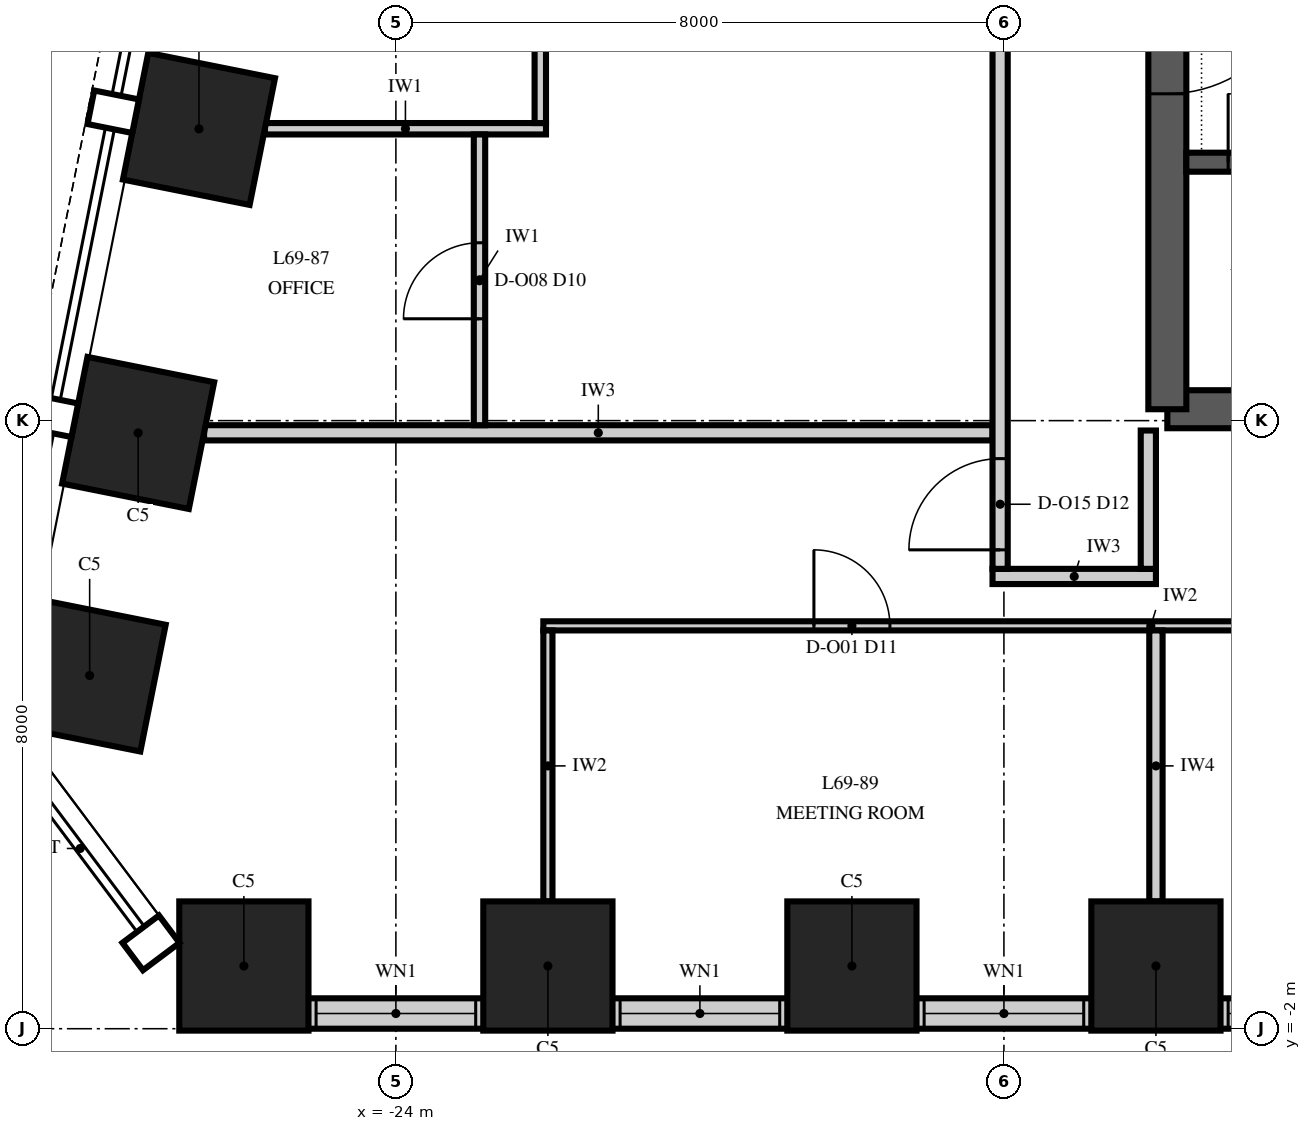
"""IFC4 building model, lengths in metres.
Left out: names, types, materials, properties, quantities, classifications, styles, units other than length and angle.
Written with IfcOpenShell. Run it as: python <this file> out.ifc"""

import sys

from ifc_helpers import new_model, si_unit, direction, frame, frame_2d, origin, origin_2d, place, context, subcontext, project, spatial, polyline, rectangle, outline, extrude, element, fill, save


model = new_model("IFC4")
c1 = context("Model", 3, precision=1e-05, world=origin(), true_north=direction((0.0, 1.0)))
c2 = subcontext(c1, "Body", "Model", "MODEL_VIEW")
j1 = project(units=[si_unit("LENGTHUNIT", "METRE"), si_unit("PLANEANGLEUNIT", "RADIAN")], contexts=[c1])
p1 = place(None, origin())
s1 = spatial("IfcSite", under=j1, at=p1, CompositionType="ELEMENT")
p2 = place(p1, origin())
s2 = spatial("IfcBuilding", under=s1, at=p2, CompositionType="ELEMENT")
p3 = place(p2, frame((0.0, 0.0, 296.0)))
s3 = spatial("IfcBuildingStorey", under=s2, at=p3, CompositionType="ELEMENT", Elevation=296.0)
for number, where, z_axis, x_axis in (
    (1, (-26.0, -1.175, -0.25), (0.0, 0.0, 1.0), (1.0, 0.0, 0.0)),
    (2, (-22.0, -1.175, -0.25), (0.0, 0.0, 1.0), (1.0, 0.0, 0.0)),
    (3, (-18.0, -1.175, -0.25), (0.0, 0.0, 1.0), (1.0, 0.0, 0.0)),
    (4, (-14.0, -1.175, -0.25), (0.0, 0.0, 1.0), (1.0, 0.0, 0.0)),
):
    element("IfcColumn", number, at=place(p3, frame(where, z_axis=z_axis, x_axis=x_axis)), inside=s3, PredefinedType="COLUMN", context=c2, shape_type="SweptSolid", body=[
        extrude(rectangle(XDim=1.7, YDim=1.7, at=origin_2d()), origin(), (0.0, 0.0, 1.0), 4.25),
    ])
for number, where, z_axis, x_axis in (
    (5, (-26.591, 9.838, 0.0), (0.0, 0.0, 1.0), (-0.196, -0.981, 0.0)),
    (6, (-27.391, 5.838, 0.0), (0.0, 0.0, 1.0), (-0.196, -0.981, 0.0)),
    (7, (-28.029, 2.647, 0.0), (0.0, 0.0, 1.0), (-0.196, -0.981, 0.0)),
):
    element("IfcColumn", number, at=place(p3, frame(where, z_axis=z_axis, x_axis=x_axis)), inside=s3, PredefinedType="COLUMN", context=c2, shape_type="SweptSolid", body=[
        extrude(rectangle(XDim=1.7, YDim=1.7, at=origin_2d()), origin(), (0.0, 0.0, 1.0), 4.0),
    ])
p4 = place(p3, frame((-13.85, 6.15, 0.0), z_axis=(0.0, 0.0, 1.0), x_axis=(1.0, 0.0, 0.0)))
e8 = element("IfcWall", 8, at=p4, inside=s3, PredefinedType="SHEAR", context=c2, shape_type="SweptSolid", body=[
    extrude(rectangle(XDim=27.7, YDim=0.5, at=frame_2d((13.85, 0.0))), origin(), (0.0, 0.0, 1.0), 4.0),
])
p5 = place(p3, frame((-13.85, 23.85, 0.0), z_axis=(0.0, 0.0, 1.0), x_axis=(0.0, -1.0, 0.0)))
e9 = element("IfcWall", 9, at=p5, inside=s3, PredefinedType="SHEAR", context=c2, shape_type="SweptSolid", body=[
    extrude(outline(polyline([(0.0, -0.25), (17.7, -0.25), (17.7, 0.0), (17.45, 0.0), (17.45, 0.25), (0.25, 0.25), (0.25, 0.0), (0.0, 0.0), (0.0, -0.25)])), origin(), (0.0, 0.0, 1.0), 4.0),
])
p6 = place(p5, frame((11.75, 0.0, 0.0)))
e10 = element("IfcOpeningElement", 10, at=p6, cuts=e9, PredefinedType="OPENING", context=c2, shape_type="SweptSolid", body=[
    extrude(rectangle(XDim=1.8, YDim=2.4, at=frame_2d((0.9, 1.2))), frame((0.0, 0.265, 0.0), z_axis=(0.0, -1.0, 0.0), x_axis=(1.0, 0.0, 0.0)), (0.0, 0.0, 1.0), 0.53),
])
p7 = place(p3, frame((-13.6, 9.4, 0.0), z_axis=(0.0, 0.0, 1.0), x_axis=(1.0, 0.0, 0.0)))
e11 = element("IfcWall", 11, at=p7, inside=s3, PredefinedType="SHEAR", context=c2, shape_type="SweptSolid", body=[
    extrude(rectangle(XDim=27.2, YDim=0.25, at=frame_2d((13.6, 0.0))), origin(), (0.0, 0.0, 1.0), 4.0),
])
p8 = place(p7, frame((8.85, 0.0, 0.0)))
e12 = element("IfcOpeningElement", 12, at=p8, cuts=e11, PredefinedType="OPENING", context=c2, shape_type="SweptSolid", body=[
    extrude(rectangle(XDim=1.1, YDim=2.1, at=frame_2d((0.55, 1.05))), frame((0.0, 0.14, 0.0), z_axis=(0.0, -1.0, 0.0), x_axis=(1.0, 0.0, 0.0)), (0.0, 0.0, 1.0), 0.28),
])
p9 = place(p7, frame((11.65, 0.0, 0.0)))
e13 = element("IfcOpeningElement", 13, at=p9, cuts=e11, PredefinedType="OPENING", context=c2, shape_type="SweptSolid", body=[
    extrude(rectangle(XDim=1.1, YDim=2.1, at=frame_2d((0.55, 1.05))), frame((0.0, 0.14, 0.0), z_axis=(0.0, -1.0, 0.0), x_axis=(1.0, 0.0, 0.0)), (0.0, 0.0, 1.0), 0.28),
])
p10 = place(p7, frame((14.45, 0.0, 0.0)))
e14 = element("IfcOpeningElement", 14, at=p10, cuts=e11, PredefinedType="OPENING", context=c2, shape_type="SweptSolid", body=[
    extrude(rectangle(XDim=1.1, YDim=2.1, at=frame_2d((0.55, 1.05))), frame((0.0, 0.14, 0.0), z_axis=(0.0, -1.0, 0.0), x_axis=(1.0, 0.0, 0.0)), (0.0, 0.0, 1.0), 0.28),
])
p11 = place(p7, frame((0.55, 0.0, 0.0)))
e15 = element("IfcOpeningElement", 15, at=p11, cuts=e11, PredefinedType="OPENING", context=c2, shape_type="SweptSolid", body=[
    extrude(rectangle(XDim=0.9, YDim=2.1, at=frame_2d((0.45, 1.05))), frame((0.0, 0.14, 0.0), z_axis=(0.0, -1.0, 0.0), x_axis=(1.0, 0.0, 0.0)), (0.0, 0.0, 1.0), 0.28),
])
p12 = place(p7, frame((3.35, 0.0, 0.0)))
e16 = element("IfcOpeningElement", 16, at=p12, cuts=e11, PredefinedType="OPENING", context=c2, shape_type="SweptSolid", body=[
    extrude(rectangle(XDim=0.9, YDim=2.1, at=frame_2d((0.45, 1.05))), frame((0.0, 0.14, 0.0), z_axis=(0.0, -1.0, 0.0), x_axis=(1.0, 0.0, 0.0)), (0.0, 0.0, 1.0), 0.28),
])
p13 = place(p7, frame((6.15, 0.0, 0.0)))
e17 = element("IfcOpeningElement", 17, at=p13, cuts=e11, PredefinedType="OPENING", context=c2, shape_type="SweptSolid", body=[
    extrude(rectangle(XDim=0.9, YDim=2.1, at=frame_2d((0.45, 1.05))), frame((0.0, 0.14, 0.0), z_axis=(0.0, -1.0, 0.0), x_axis=(1.0, 0.0, 0.0)), (0.0, 0.0, 1.0), 0.28),
])
p14 = place(p7, frame((17.35, 0.0, 0.0)))
e18 = element("IfcOpeningElement", 18, at=p14, cuts=e11, PredefinedType="OPENING", context=c2, shape_type="SweptSolid", body=[
    extrude(rectangle(XDim=0.9, YDim=2.1, at=frame_2d((0.45, 1.05))), frame((0.0, 0.14, 0.0), z_axis=(0.0, -1.0, 0.0), x_axis=(1.0, 0.0, 0.0)), (0.0, 0.0, 1.0), 0.28),
])
p15 = place(p7, frame((20.15, 0.0, 0.0)))
e19 = element("IfcOpeningElement", 19, at=p15, cuts=e11, PredefinedType="OPENING", context=c2, shape_type="SweptSolid", body=[
    extrude(rectangle(XDim=0.9, YDim=2.1, at=frame_2d((0.45, 1.05))), frame((0.0, 0.14, 0.0), z_axis=(0.0, -1.0, 0.0), x_axis=(1.0, 0.0, 0.0)), (0.0, 0.0, 1.0), 0.28),
])
p16 = place(p7, frame((22.95, 0.0, 0.0)))
e20 = element("IfcOpeningElement", 20, at=p16, cuts=e11, PredefinedType="OPENING", context=c2, shape_type="SweptSolid", body=[
    extrude(rectangle(XDim=0.9, YDim=2.1, at=frame_2d((0.45, 1.05))), frame((0.0, 0.14, 0.0), z_axis=(0.0, -1.0, 0.0), x_axis=(1.0, 0.0, 0.0)), (0.0, 0.0, 1.0), 0.28),
])
p17 = place(p3, frame((-26.0, -1.8, 0.0), z_axis=(0.0, 0.0, 1.0), x_axis=(1.0, 0.0, 0.0)))
e21 = element("IfcWall", 21, at=p17, inside=s3, PredefinedType="SOLIDWALL", context=c2, shape_type="SweptSolid", body=[
    extrude(rectangle(XDim=52.0, YDim=0.4, at=frame_2d((26.0, 0.0))), origin(), (0.0, 0.0, 1.0), 2.0),
])
p18 = place(p17, frame((0.95, 0.0, 0.8)))
e22 = element("IfcOpeningElement", 22, at=p18, cuts=e21, PredefinedType="OPENING", context=c2, shape_type="SweptSolid", body=[
    extrude(rectangle(XDim=2.1, YDim=1.15, at=frame_2d((1.05, 0.575))), frame((0.0, 0.215, 0.0), z_axis=(0.0, -1.0, 0.0), x_axis=(1.0, 0.0, 0.0)), (0.0, 0.0, 1.0), 0.43),
])
p19 = place(p17, frame((4.95, 0.0, 0.8)))
e23 = element("IfcOpeningElement", 23, at=p19, cuts=e21, PredefinedType="OPENING", context=c2, shape_type="SweptSolid", body=[
    extrude(rectangle(XDim=2.1, YDim=1.15, at=frame_2d((1.05, 0.575))), frame((0.0, 0.215, 0.0), z_axis=(0.0, -1.0, 0.0), x_axis=(1.0, 0.0, 0.0)), (0.0, 0.0, 1.0), 0.43),
])
p20 = place(p17, frame((8.95, 0.0, 0.8)))
e24 = element("IfcOpeningElement", 24, at=p20, cuts=e21, PredefinedType="OPENING", context=c2, shape_type="SweptSolid", body=[
    extrude(rectangle(XDim=2.1, YDim=1.15, at=frame_2d((1.05, 0.575))), frame((0.0, 0.215, 0.0), z_axis=(0.0, -1.0, 0.0), x_axis=(1.0, 0.0, 0.0)), (0.0, 0.0, 1.0), 0.43),
])
p21 = place(p17, frame((12.95, 0.0, 0.8)))
e25 = element("IfcOpeningElement", 25, at=p21, cuts=e21, PredefinedType="OPENING", context=c2, shape_type="SweptSolid", body=[
    extrude(rectangle(XDim=2.1, YDim=1.15, at=frame_2d((1.05, 0.575))), frame((0.0, 0.215, 0.0), z_axis=(0.0, -1.0, 0.0), x_axis=(1.0, 0.0, 0.0)), (0.0, 0.0, 1.0), 0.43),
])
p22 = place(p17, frame((16.95, 0.0, 0.8)))
e26 = element("IfcOpeningElement", 26, at=p22, cuts=e21, PredefinedType="OPENING", context=c2, shape_type="SweptSolid", body=[
    extrude(rectangle(XDim=2.1, YDim=1.15, at=frame_2d((1.05, 0.575))), frame((0.0, 0.215, 0.0), z_axis=(0.0, -1.0, 0.0), x_axis=(1.0, 0.0, 0.0)), (0.0, 0.0, 1.0), 0.43),
])
p23 = place(p17, frame((21.1, 0.0, 0.0)))
e27 = element("IfcOpeningElement", 27, at=p23, cuts=e21, PredefinedType="OPENING", context=c2, shape_type="SweptSolid", body=[
    extrude(rectangle(XDim=1.8, YDim=2.0, at=frame_2d((0.9, 1.0))), frame((0.0, 0.215, 0.0), z_axis=(0.0, -1.0, 0.0), x_axis=(1.0, 0.0, 0.0)), (0.0, 0.0, 1.0), 0.43),
])
p24 = place(p17, frame((24.95, 0.0, 0.8)))
e28 = element("IfcOpeningElement", 28, at=p24, cuts=e21, PredefinedType="OPENING", context=c2, shape_type="SweptSolid", body=[
    extrude(rectangle(XDim=2.1, YDim=1.15, at=frame_2d((1.05, 0.575))), frame((0.0, 0.215, 0.0), z_axis=(0.0, -1.0, 0.0), x_axis=(1.0, 0.0, 0.0)), (0.0, 0.0, 1.0), 0.43),
])
p25 = place(p17, frame((29.1, 0.0, 0.0)))
e29 = element("IfcOpeningElement", 29, at=p25, cuts=e21, PredefinedType="OPENING", context=c2, shape_type="SweptSolid", body=[
    extrude(rectangle(XDim=1.8, YDim=2.0, at=frame_2d((0.9, 1.0))), frame((0.0, 0.215, 0.0), z_axis=(0.0, -1.0, 0.0), x_axis=(1.0, 0.0, 0.0)), (0.0, 0.0, 1.0), 0.43),
])
p26 = place(p17, frame((32.95, 0.0, 0.8)))
e30 = element("IfcOpeningElement", 30, at=p26, cuts=e21, PredefinedType="OPENING", context=c2, shape_type="SweptSolid", body=[
    extrude(rectangle(XDim=2.1, YDim=1.15, at=frame_2d((1.05, 0.575))), frame((0.0, 0.215, 0.0), z_axis=(0.0, -1.0, 0.0), x_axis=(1.0, 0.0, 0.0)), (0.0, 0.0, 1.0), 0.43),
])
p27 = place(p17, frame((36.95, 0.0, 0.8)))
e31 = element("IfcOpeningElement", 31, at=p27, cuts=e21, PredefinedType="OPENING", context=c2, shape_type="SweptSolid", body=[
    extrude(rectangle(XDim=2.1, YDim=1.15, at=frame_2d((1.05, 0.575))), frame((0.0, 0.215, 0.0), z_axis=(0.0, -1.0, 0.0), x_axis=(1.0, 0.0, 0.0)), (0.0, 0.0, 1.0), 0.43),
])
p28 = place(p17, frame((40.95, 0.0, 0.8)))
e32 = element("IfcOpeningElement", 32, at=p28, cuts=e21, PredefinedType="OPENING", context=c2, shape_type="SweptSolid", body=[
    extrude(rectangle(XDim=2.1, YDim=1.15, at=frame_2d((1.05, 0.575))), frame((0.0, 0.215, 0.0), z_axis=(0.0, -1.0, 0.0), x_axis=(1.0, 0.0, 0.0)), (0.0, 0.0, 1.0), 0.43),
])
p29 = place(p17, frame((44.95, 0.0, 0.8)))
e33 = element("IfcOpeningElement", 33, at=p29, cuts=e21, PredefinedType="OPENING", context=c2, shape_type="SweptSolid", body=[
    extrude(rectangle(XDim=2.1, YDim=1.15, at=frame_2d((1.05, 0.575))), frame((0.0, 0.215, 0.0), z_axis=(0.0, -1.0, 0.0), x_axis=(1.0, 0.0, 0.0)), (0.0, 0.0, 1.0), 0.43),
])
p30 = place(p17, frame((48.95, 0.0, 0.8)))
e34 = element("IfcOpeningElement", 34, at=p30, cuts=e21, PredefinedType="OPENING", context=c2, shape_type="SweptSolid", body=[
    extrude(rectangle(XDim=2.1, YDim=1.15, at=frame_2d((1.05, 0.575))), frame((0.0, 0.215, 0.0), z_axis=(0.0, -1.0, 0.0), x_axis=(1.0, 0.0, 0.0)), (0.0, 0.0, 1.0), 0.43),
])
p31 = place(p3, frame((-22.06, 3.3, 0.0), z_axis=(0.0, 0.0, 1.0), x_axis=(1.0, 0.0, 0.0)))
e35 = element("IfcWall", 35, at=p31, inside=s3, PredefinedType="PARTITIONING", context=c2, shape_type="SweptSolid", body=[
    extrude(rectangle(XDim=15.985, YDim=0.12, at=frame_2d((7.993, 0.0))), origin(), (0.0, 0.0, 1.0), 3.23),
])
p32 = place(p31, frame((3.56, 0.0, 0.0)))
e36 = element("IfcOpeningElement", 36, at=p32, cuts=e35, PredefinedType="OPENING", context=c2, shape_type="SweptSolid", body=[
    extrude(rectangle(XDim=1.0, YDim=2.4, at=frame_2d((0.5, 1.2))), frame((0.0, 0.075, 0.0), z_axis=(0.0, -1.0, 0.0), x_axis=(1.0, 0.0, 0.0)), (0.0, 0.0, 1.0), 0.15),
])
p33 = place(p31, frame((11.56, 0.0, 0.0)))
e37 = element("IfcOpeningElement", 37, at=p33, cuts=e35, PredefinedType="OPENING", context=c2, shape_type="SweptSolid", body=[
    extrude(rectangle(XDim=1.0, YDim=2.4, at=frame_2d((0.5, 1.2))), frame((0.0, 0.075, 0.0), z_axis=(0.0, -1.0, 0.0), x_axis=(1.0, 0.0, 0.0)), (0.0, 0.0, 1.0), 0.15),
])
p34 = place(p3, frame((-16.15, 3.95, 0.0), z_axis=(0.0, 0.0, 1.0), x_axis=(1.0, 0.0, 0.0)))
e38 = element("IfcWall", 38, at=p34, inside=s3, PredefinedType="PARTITIONING", context=c2, shape_type="SweptSolid", body=[
    extrude(rectangle(XDim=2.15, YDim=0.2, at=frame_2d((1.075, 0.0))), origin(), (0.0, 0.0, 1.0), 3.85),
])
p35 = place(p3, frame((-26.524, 5.84, 0.0), z_axis=(0.0, 0.0, 1.0), x_axis=(1.0, 0.0, 0.0)))
e39 = element("IfcWall", 39, at=p35, inside=s3, PredefinedType="PARTITIONING", context=c2, shape_type="SweptSolid", body=[
    extrude(rectangle(XDim=10.374, YDim=0.2, at=frame_2d((5.187, 0.0))), origin(), (0.0, 0.0, 1.0), 2.842),
])
p36 = place(p3, frame((-25.724, 9.84, 0.0), z_axis=(0.0, 0.0, 1.0), x_axis=(1.0, 0.0, 0.0)))
e40 = element("IfcWall", 40, at=p36, inside=s3, PredefinedType="PARTITIONING", context=c2, shape_type="SweptSolid", body=[
    extrude(rectangle(XDim=3.699, YDim=0.15, at=frame_2d((1.85, 0.0))), origin(), (0.0, 0.0, 1.0), 3.23),
])
p37 = place(p3, frame((-22.9, 5.94, 0.0), z_axis=(0.0, 0.0, 1.0), x_axis=(0.0, 1.0, 0.0)))
e41 = element("IfcWall", 41, at=p37, inside=s3, PredefinedType="PARTITIONING", context=c2, shape_type="SweptSolid", body=[
    extrude(rectangle(XDim=3.825, YDim=0.15, at=frame_2d((1.913, 0.0))), origin(), (0.0, 0.0, 1.0), 2.842),
])
p38 = place(p37, frame((1.4, 0.0, 0.0)))
e42 = element("IfcOpeningElement", 42, at=p38, cuts=e41, PredefinedType="OPENING", context=c2, shape_type="SweptSolid", body=[
    extrude(rectangle(XDim=1.0, YDim=2.3, at=frame_2d((0.5, 1.15))), frame((0.0, 0.09, 0.0), z_axis=(0.0, -1.0, 0.0), x_axis=(1.0, 0.0, 0.0)), (0.0, 0.0, 1.0), 0.18),
])
p39 = place(p3, frame((-22.1, 9.915, 0.0), z_axis=(0.0, 0.0, 1.0), x_axis=(0.0, 1.0, 0.0)))
e43 = element("IfcWall", 43, at=p39, inside=s3, PredefinedType="PARTITIONING", context=c2, shape_type="SweptSolid", body=[
    extrude(rectangle(XDim=3.85, YDim=0.15, at=frame_2d((1.925, 0.0))), origin(), (0.0, 0.0, 1.0), 3.85),
])
p40 = place(p39, frame((1.425, 0.0, 0.0)))
e44 = element("IfcOpeningElement", 44, at=p40, cuts=e43, PredefinedType="OPENING", context=c2, shape_type="SweptSolid", body=[
    extrude(rectangle(XDim=1.0, YDim=2.3, at=frame_2d((0.5, 1.15))), frame((0.0, 0.09, 0.0), z_axis=(0.0, -1.0, 0.0), x_axis=(1.0, 0.0, 0.0)), (0.0, 0.0, 1.0), 0.18),
])
p41 = place(p3, frame((-22.0, -0.325, 0.0), z_axis=(0.0, 0.0, 1.0), x_axis=(0.0, 1.0, 0.0)))
e45 = element("IfcWall", 45, at=p41, inside=s3, PredefinedType="PARTITIONING", context=c2, shape_type="SweptSolid", body=[
    extrude(rectangle(XDim=3.565, YDim=0.12, at=frame_2d((1.782, 0.0))), origin(), (0.0, 0.0, 1.0), 3.23),
])
p42 = place(p3, frame((-16.05, 4.05, 0.0), z_axis=(0.0, 0.0, 1.0), x_axis=(0.0, 1.0, 0.0)))
e46 = element("IfcWall", 46, at=p42, inside=s3, PredefinedType="PARTITIONING", context=c2, shape_type="SweptSolid", body=[
    extrude(rectangle(XDim=21.9, YDim=0.2, at=frame_2d((10.95, 0.0))), origin(), (0.0, 0.0, 1.0), 2.842),
])
p43 = place(p42, frame((0.25, 0.0, 0.0)))
e47 = element("IfcOpeningElement", 47, at=p43, cuts=e46, PredefinedType="OPENING", context=c2, shape_type="SweptSolid", body=[
    extrude(rectangle(XDim=1.2, YDim=2.4, at=frame_2d((0.6, 1.2))), frame((0.0, 0.115, 0.0), z_axis=(0.0, -1.0, 0.0), x_axis=(1.0, 0.0, 0.0)), (0.0, 0.0, 1.0), 0.23),
])
p44 = place(p42, frame((7.35, 0.0, 0.0)))
e48 = element("IfcOpeningElement", 48, at=p44, cuts=e46, PredefinedType="OPENING", context=c2, shape_type="SweptSolid", body=[
    extrude(rectangle(XDim=1.2, YDim=2.4, at=frame_2d((0.6, 1.2))), frame((0.0, 0.115, 0.0), z_axis=(0.0, -1.0, 0.0), x_axis=(1.0, 0.0, 0.0)), (0.0, 0.0, 1.0), 0.23),
])
p45 = place(p42, frame((20.35, 0.0, 0.0)))
e49 = element("IfcOpeningElement", 49, at=p45, cuts=e46, PredefinedType="OPENING", context=c2, shape_type="SweptSolid", body=[
    extrude(rectangle(XDim=1.2, YDim=2.4, at=frame_2d((0.6, 1.2))), frame((0.0, 0.115, 0.0), z_axis=(0.0, -1.0, 0.0), x_axis=(1.0, 0.0, 0.0)), (0.0, 0.0, 1.0), 0.23),
])
p46 = place(p3, frame((-14.1, 4.05, 0.0), z_axis=(0.0, 0.0, 1.0), x_axis=(0.0, 1.0, 0.0)))
e50 = element("IfcWall", 50, at=p46, inside=s3, PredefinedType="PARTITIONING", context=c2, shape_type="SweptSolid", body=[
    extrude(rectangle(XDim=1.82, YDim=0.2, at=frame_2d((0.91, 0.0))), origin(), (0.0, 0.0, 1.0), 3.85),
])
p47 = place(p3, frame((-14.0, -0.325, 0.0), z_axis=(0.0, 0.0, 1.0), x_axis=(0.0, 1.0, 0.0)))
e51 = element("IfcWall", 51, at=p47, inside=s3, PredefinedType="PARTITIONING", context=c2, shape_type="SweptSolid", body=[
    extrude(rectangle(XDim=3.565, YDim=0.175, at=frame_2d((1.782, 0.0))), origin(), (0.0, 0.0, 1.0), 3.23),
])
p48 = place(p18, origin())
e52 = element("IfcWindow", 52, at=p48, inside=s3, PartitioningType="SINGLE_PANEL", PredefinedType="WINDOW", context=c2, shape_type="SweptSolid", body=[
    extrude(rectangle(XDim=2.1, YDim=1.15, at=frame_2d((1.05, 0.575))), frame((0.0, 0.03, 0.0), z_axis=(0.0, -1.0, 0.0), x_axis=(1.0, 0.0, 0.0)), (0.0, 0.0, 1.0), 0.06),
])
fill(e22, e52)
p49 = place(p19, origin())
e53 = element("IfcWindow", 53, at=p49, inside=s3, PartitioningType="SINGLE_PANEL", PredefinedType="WINDOW", context=c2, shape_type="SweptSolid", body=[
    extrude(rectangle(XDim=2.1, YDim=1.15, at=frame_2d((1.05, 0.575))), frame((0.0, 0.03, 0.0), z_axis=(0.0, -1.0, 0.0), x_axis=(1.0, 0.0, 0.0)), (0.0, 0.0, 1.0), 0.06),
])
fill(e23, e53)
p50 = place(p20, origin())
e54 = element("IfcWindow", 54, at=p50, inside=s3, PartitioningType="SINGLE_PANEL", PredefinedType="WINDOW", context=c2, shape_type="SweptSolid", body=[
    extrude(rectangle(XDim=2.1, YDim=1.15, at=frame_2d((1.05, 0.575))), frame((0.0, 0.03, 0.0), z_axis=(0.0, -1.0, 0.0), x_axis=(1.0, 0.0, 0.0)), (0.0, 0.0, 1.0), 0.06),
])
fill(e24, e54)
p51 = place(p21, origin())
e55 = element("IfcWindow", 55, at=p51, inside=s3, PartitioningType="SINGLE_PANEL", PredefinedType="WINDOW", context=c2, shape_type="SweptSolid", body=[
    extrude(rectangle(XDim=2.1, YDim=1.15, at=frame_2d((1.05, 0.575))), frame((0.0, 0.03, 0.0), z_axis=(0.0, -1.0, 0.0), x_axis=(1.0, 0.0, 0.0)), (0.0, 0.0, 1.0), 0.06),
])
fill(e25, e55)
p52 = place(p6, origin())
e56 = element("IfcDoor", 56, at=p52, inside=s3, OperationType="DOUBLE_DOOR_SINGLE_SWING", PredefinedType="DOOR", context=c2, shape_type="SweptSolid", body=[
    extrude(rectangle(XDim=1.8, YDim=2.4, at=frame_2d((0.9, 1.2))), frame((0.0, 0.25, 0.0), z_axis=(0.0, -1.0, 0.0), x_axis=(1.0, 0.0, 0.0)), (0.0, 0.0, 1.0), 0.5),
])
fill(e10, e56)
p53 = place(p11, origin())
e57 = element("IfcDoor", 57, at=p53, inside=s3, OperationType="SINGLE_SWING_LEFT", PredefinedType="DOOR", context=c2, shape_type="SweptSolid", body=[
    extrude(rectangle(XDim=0.9, YDim=2.1, at=frame_2d((0.45, 1.05))), frame((0.0, 0.125, 0.0), z_axis=(0.0, -1.0, 0.0), x_axis=(1.0, 0.0, 0.0)), (0.0, 0.0, 1.0), 0.25),
])
fill(e15, e57)
p54 = place(p32, origin())
e58 = element("IfcDoor", 58, at=p54, inside=s3, OperationType="SINGLE_SWING_RIGHT", PredefinedType="DOOR", context=c2, shape_type="SweptSolid", body=[
    extrude(rectangle(XDim=1.0, YDim=2.4, at=frame_2d((0.5, 1.2))), frame((0.0, 0.06, 0.0), z_axis=(0.0, -1.0, 0.0), x_axis=(1.0, 0.0, 0.0)), (0.0, 0.0, 1.0), 0.12),
])
fill(e36, e58)
p55 = place(p38, origin())
e59 = element("IfcDoor", 59, at=p55, inside=s3, OperationType="SINGLE_SWING_LEFT", PredefinedType="DOOR", context=c2, shape_type="SweptSolid", body=[
    extrude(rectangle(XDim=1.0, YDim=2.3, at=frame_2d((0.5, 1.15))), frame((0.0, 0.075, 0.0), z_axis=(0.0, -1.0, 0.0), x_axis=(1.0, 0.0, 0.0)), (0.0, 0.0, 1.0), 0.149),
])
fill(e42, e59)
p56 = place(p43, origin())
e60 = element("IfcDoor", 60, at=p56, inside=s3, OperationType="SINGLE_SWING_LEFT", PredefinedType="DOOR", context=c2, shape_type="SweptSolid", body=[
    extrude(rectangle(XDim=1.2, YDim=2.4, at=frame_2d((0.6, 1.2))), frame((0.0, 0.1, 0.0), z_axis=(0.0, -1.0, 0.0), x_axis=(1.0, 0.0, 0.0)), (0.0, 0.0, 1.0), 0.199),
])
fill(e47, e60)
save(model, sys.argv[1])
